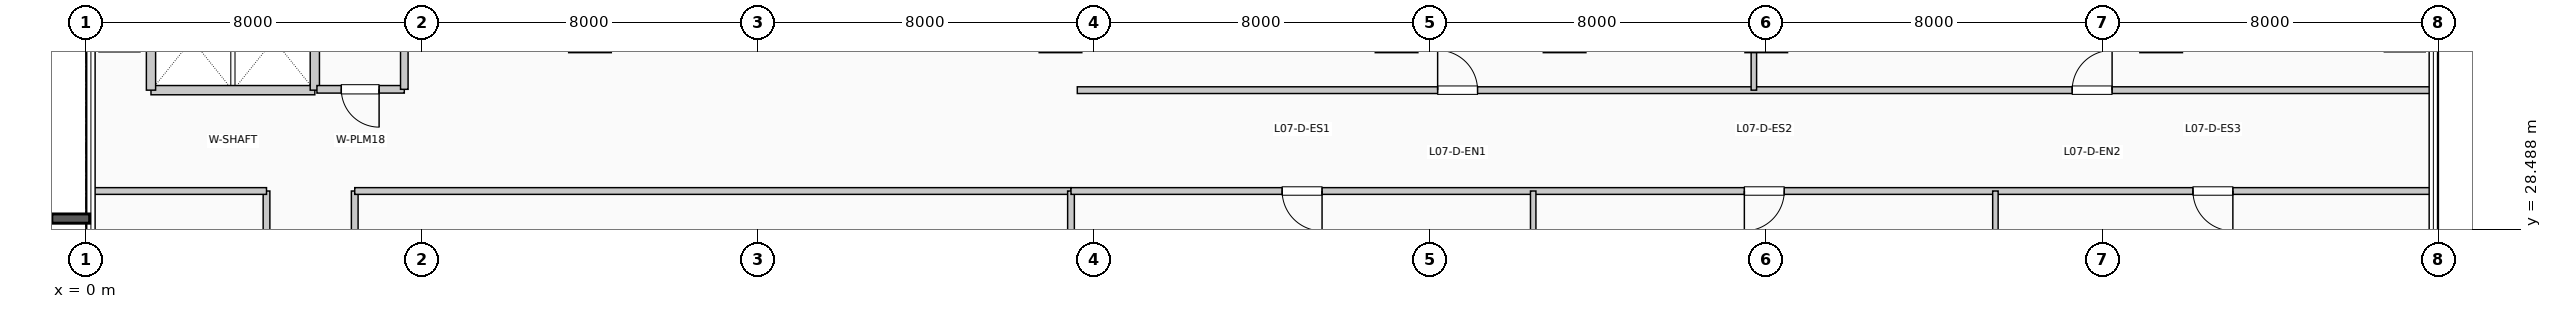
"""IFC4 building model, lengths in metres.
Left out: names, types, materials, properties, quantities, classifications, styles, units other than length and angle.
Written with IfcOpenShell. Run it as: python <this file> out.ifc"""

import sys

from ifc_helpers import new_model, si_unit, direction, frame, frame_2d, origin, place, context, subcontext, project, spatial, rectangle, extrude, element, fill, save


model = new_model("IFC4")
c1 = context("Model", 3, precision=1e-05, world=origin(), true_north=direction((0.0, 1.0)))
c2 = subcontext(c1, "Body", "Model", "MODEL_VIEW")
j1 = project(units=[si_unit("LENGTHUNIT", "METRE"), si_unit("PLANEANGLEUNIT", "RADIAN")], contexts=[c1])
p1 = place(None, origin())
s1 = spatial("IfcSite", under=j1, at=p1, CompositionType="ELEMENT")
p2 = place(p1, origin())
s2 = spatial("IfcBuilding", under=s1, at=p2, CompositionType="ELEMENT")
p3 = place(p2, frame((0.0, 0.0, 34.32)))
s3 = spatial("IfcBuildingStorey", under=s2, at=p3, CompositionType="ELEMENT", Elevation=34.32)
p4 = place(p3, frame((1.55, 31.8, 0.0), z_axis=(0.0, 0.0, 1.0), x_axis=(1.0, 0.0, 0.0)))
e1 = element("IfcWall", 1, at=p4, inside=s3, PredefinedType="PARTITIONING", context=c2, shape_type="SweptSolid", body=[
    extrude(rectangle(XDim=3.9, YDim=0.22, at=frame_2d((1.95, 0.0))), origin(), (0.0, 0.0, 1.0), 3.71),
])
for number, where, z_axis, x_axis in (
    (2, (1.55, 31.8, 0.0), (0.0, 0.0, 1.0), (0.0, 1.0, 0.0)),
    (3, (5.45, 31.8, 0.0), (0.0, 0.0, 1.0), (0.0, 1.0, 0.0)),
):
    element("IfcWall", number, at=place(p3, frame(where, z_axis=z_axis, x_axis=x_axis)), inside=s3, PredefinedType="PARTITIONING", context=c2, shape_type="SweptSolid", body=[
        extrude(rectangle(XDim=2.38, YDim=0.22, at=frame_2d((1.19, 0.0))), origin(), (0.0, 0.0, 1.0), 3.71),
    ])
p5 = place(p3, frame((5.5, 31.82, 0.0), z_axis=(0.0, 0.0, 1.0), x_axis=(1.0, 0.0, 0.0)))
e4 = element("IfcWall", 4, at=p5, inside=s3, PredefinedType="PLUMBINGWALL", context=c2, shape_type="SweptSolid", body=[
    extrude(rectangle(XDim=2.08, YDim=0.18, at=frame_2d((1.04, 0.0))), origin(), (0.0, 0.0, 1.0), 3.71),
])
p6 = place(p5, frame((1.48, 0.0, 0.0), z_axis=(0.0, 0.0, 1.0), x_axis=(-1.0, 0.0, 0.0)))
e5 = element("IfcOpeningElement", 5, at=p6, cuts=e4, PredefinedType="OPENING", context=c2, shape_type="SweptSolid", body=[
    extrude(rectangle(XDim=0.9, YDim=2.1, at=frame_2d((0.45, 1.05))), frame((0.0, 0.1, 0.0), z_axis=(0.0, -1.0, 0.0), x_axis=(1.0, 0.0, 0.0)), (0.0, 0.0, 1.0), 0.2),
])
p7 = place(p3, frame((7.58, 31.82, 0.0), z_axis=(0.0, 0.0, 1.0), x_axis=(0.0, 1.0, 0.0)))
e6 = element("IfcWall", 6, at=p7, inside=s3, PredefinedType="PLUMBINGWALL", context=c2, shape_type="SweptSolid", body=[
    extrude(rectangle(XDim=2.36, YDim=0.18, at=frame_2d((1.18, 0.0))), origin(), (0.0, 0.0, 1.0), 3.71),
])
p8 = place(p3, frame((4.3, 4.39, 0.0), z_axis=(0.0, 0.0, 1.0), x_axis=(0.0, 1.0, 0.0)))
e7 = element("IfcWall", 7, at=p8, inside=s3, PredefinedType="PARTITIONING", context=c2, shape_type="SweptSolid", body=[
    extrude(rectangle(XDim=25.01, YDim=0.16, at=frame_2d((12.505, 0.0))), origin(), (0.0, 0.0, 1.0), 3.71),
])
p9 = place(p8, frame((6.728, 0.0, 0.0), z_axis=(0.0, 0.0, 1.0), x_axis=(-1.0, 0.0, 0.0)))
e8 = element("IfcOpeningElement", 8, at=p9, cuts=e7, PredefinedType="OPENING", context=c2, shape_type="SweptSolid", body=[
    extrude(rectangle(XDim=0.95, YDim=2.15, at=frame_2d((0.475, 1.075))), frame((0.0, 0.09, 0.0), z_axis=(0.0, -1.0, 0.0), x_axis=(1.0, 0.0, 0.0)), (0.0, 0.0, 1.0), 0.18),
])
p10 = place(p8, frame((19.232, 0.0, 0.0), z_axis=(0.0, 0.0, 1.0), x_axis=(-1.0, 0.0, 0.0)))
e9 = element("IfcOpeningElement", 9, at=p10, cuts=e7, PredefinedType="OPENING", context=c2, shape_type="SweptSolid", body=[
    extrude(rectangle(XDim=0.95, YDim=2.15, at=frame_2d((0.475, 1.075))), frame((0.0, 0.09, 0.0), z_axis=(0.0, -1.0, 0.0), x_axis=(1.0, 0.0, 0.0)), (0.0, 0.0, 1.0), 0.18),
])
p11 = place(p3, frame((6.4, 4.39, 0.0), z_axis=(0.0, 0.0, 1.0), x_axis=(0.0, 1.0, 0.0)))
e10 = element("IfcWall", 10, at=p11, inside=s3, PredefinedType="PARTITIONING", context=c2, shape_type="SweptSolid", body=[
    extrude(rectangle(XDim=25.01, YDim=0.16, at=frame_2d((12.505, 0.0))), origin(), (0.0, 0.0, 1.0), 3.71),
])
p12 = place(p11, frame((2.526, 0.0, 0.0)))
e11 = element("IfcOpeningElement", 11, at=p12, cuts=e10, PredefinedType="OPENING", context=c2, shape_type="SweptSolid", body=[
    extrude(rectangle(XDim=0.95, YDim=2.15, at=frame_2d((0.475, 1.075))), frame((0.0, 0.09, 0.0), z_axis=(0.0, -1.0, 0.0), x_axis=(1.0, 0.0, 0.0)), (0.0, 0.0, 1.0), 0.18),
])
p13 = place(p11, frame((9.029, 0.0, 0.0)))
e12 = element("IfcOpeningElement", 12, at=p13, cuts=e10, PredefinedType="OPENING", context=c2, shape_type="SweptSolid", body=[
    extrude(rectangle(XDim=0.95, YDim=2.15, at=frame_2d((0.475, 1.075))), frame((0.0, 0.09, 0.0), z_axis=(0.0, -1.0, 0.0), x_axis=(1.0, 0.0, 0.0)), (0.0, 0.0, 1.0), 0.18),
])
p14 = place(p11, frame((15.781, 0.0, 0.0)))
e13 = element("IfcOpeningElement", 13, at=p14, cuts=e10, PredefinedType="OPENING", context=c2, shape_type="SweptSolid", body=[
    extrude(rectangle(XDim=0.95, YDim=2.15, at=frame_2d((0.475, 1.075))), frame((0.0, 0.09, 0.0), z_axis=(0.0, -1.0, 0.0), x_axis=(1.0, 0.0, 0.0)), (0.0, 0.0, 1.0), 0.18),
])
p15 = place(p11, frame((21.784, 0.0, 0.0)))
e14 = element("IfcOpeningElement", 14, at=p15, cuts=e10, PredefinedType="OPENING", context=c2, shape_type="SweptSolid", body=[
    extrude(rectangle(XDim=0.95, YDim=2.15, at=frame_2d((0.475, 1.075))), frame((0.0, 0.09, 0.0), z_axis=(0.0, -1.0, 0.0), x_axis=(1.0, 0.0, 0.0)), (0.0, 0.0, 1.0), 0.18),
])
p16 = place(p3, frame((0.19, 29.4, 0.0), z_axis=(0.0, 0.0, 1.0), x_axis=(1.0, 0.0, 0.0)))
e15 = element("IfcWall", 15, at=p16, inside=s3, PredefinedType="PARTITIONING", context=c2, shape_type="SweptSolid", body=[
    extrude(rectangle(XDim=4.11, YDim=0.16, at=frame_2d((2.055, 0.0))), origin(), (0.0, 0.0, 1.0), 3.365),
])
p17 = place(p3, frame((6.4, 29.4, 0.0), z_axis=(0.0, 0.0, 1.0), x_axis=(1.0, 0.0, 0.0)))
e16 = element("IfcWall", 16, at=p17, inside=s3, PredefinedType="PARTITIONING", context=c2, shape_type="SweptSolid", body=[
    extrude(rectangle(XDim=17.05, YDim=0.16, at=frame_2d((8.525, 0.0))), origin(), (0.0, 0.0, 1.0), 3.365),
])
p18 = place(p3, frame((23.45, 0.19, 0.0), z_axis=(0.0, 0.0, 1.0), x_axis=(0.0, 1.0, 0.0)))
e17 = element("IfcWall", 17, at=p18, inside=s3, PredefinedType="PARTITIONING", context=c2, shape_type="SweptSolid", body=[
    extrude(rectangle(XDim=29.21, YDim=0.16, at=frame_2d((14.605, 0.0))), origin(), (0.0, 0.0, 1.0), 2.995),
])
p19 = place(p3, frame((23.45, 29.4, 0.0), z_axis=(0.0, 0.0, 1.0), x_axis=(1.0, 0.0, 0.0)))
e18 = element("IfcWall", 18, at=p19, inside=s3, PredefinedType="PARTITIONING", context=c2, shape_type="SweptSolid", body=[
    extrude(rectangle(XDim=32.36, YDim=0.16, at=frame_2d((16.18, 0.0))), origin(), (0.0, 0.0, 1.0), 3.365),
])
p20 = place(p19, frame((5.976, 0.0, 0.0), z_axis=(0.0, 0.0, 1.0), x_axis=(-1.0, 0.0, 0.0)))
e19 = element("IfcOpeningElement", 19, at=p20, cuts=e18, PredefinedType="OPENING", context=c2, shape_type="SweptSolid", body=[
    extrude(rectangle(XDim=0.95, YDim=2.15, at=frame_2d((0.475, 1.075))), frame((0.0, 0.09, 0.0), z_axis=(0.0, -1.0, 0.0), x_axis=(1.0, 0.0, 0.0)), (0.0, 0.0, 1.0), 0.18),
])
p21 = place(p19, frame((16.979, 0.0, 0.0), z_axis=(0.0, 0.0, 1.0), x_axis=(-1.0, 0.0, 0.0)))
e20 = element("IfcOpeningElement", 20, at=p21, cuts=e18, PredefinedType="OPENING", context=c2, shape_type="SweptSolid", body=[
    extrude(rectangle(XDim=0.95, YDim=2.15, at=frame_2d((0.475, 1.075))), frame((0.0, 0.09, 0.0), z_axis=(0.0, -1.0, 0.0), x_axis=(1.0, 0.0, 0.0)), (0.0, 0.0, 1.0), 0.18),
])
p22 = place(p19, frame((27.657, 0.0, 0.0), z_axis=(0.0, 0.0, 1.0), x_axis=(-1.0, 0.0, 0.0)))
e21 = element("IfcOpeningElement", 21, at=p22, cuts=e18, PredefinedType="OPENING", context=c2, shape_type="SweptSolid", body=[
    extrude(rectangle(XDim=0.95, YDim=2.15, at=frame_2d((0.475, 1.075))), frame((0.0, 0.09, 0.0), z_axis=(0.0, -1.0, 0.0), x_axis=(1.0, 0.0, 0.0)), (0.0, 0.0, 1.0), 0.18),
])
p23 = place(p3, frame((23.6, 31.8, 0.0), z_axis=(0.0, 0.0, 1.0), x_axis=(1.0, 0.0, 0.0)))
e22 = element("IfcWall", 22, at=p23, inside=s3, PredefinedType="PARTITIONING", context=c2, shape_type="SweptSolid", body=[
    extrude(rectangle(XDim=32.21, YDim=0.16, at=frame_2d((16.105, 0.0))), origin(), (0.0, 0.0, 1.0), 3.71),
])
p24 = place(p23, frame((8.577, 0.0, 0.0)))
e23 = element("IfcOpeningElement", 23, at=p24, cuts=e22, PredefinedType="OPENING", context=c2, shape_type="SweptSolid", body=[
    extrude(rectangle(XDim=0.95, YDim=2.15, at=frame_2d((0.475, 1.075))), frame((0.0, 0.09, 0.0), z_axis=(0.0, -1.0, 0.0), x_axis=(1.0, 0.0, 0.0)), (0.0, 0.0, 1.0), 0.18),
])
p25 = place(p23, frame((23.683, 0.0, 0.0)))
e24 = element("IfcOpeningElement", 24, at=p25, cuts=e22, PredefinedType="OPENING", context=c2, shape_type="SweptSolid", body=[
    extrude(rectangle(XDim=0.95, YDim=2.15, at=frame_2d((0.475, 1.075))), frame((0.0, 0.09, 0.0), z_axis=(0.0, -1.0, 0.0), x_axis=(1.0, 0.0, 0.0)), (0.0, 0.0, 1.0), 0.18),
])
for number, where, z_axis, x_axis in (
    (25, (34.452, 18.19, 0.0), (0.0, 0.0, 1.0), (0.0, 1.0, 0.0)),
    (26, (45.455, 18.19, 0.0), (0.0, 0.0, 1.0), (0.0, 1.0, 0.0)),
):
    element("IfcWall", number, at=place(p3, frame(where, z_axis=z_axis, x_axis=x_axis)), inside=s3, PredefinedType="PARTITIONING", context=c2, shape_type="SweptSolid", body=[
        extrude(rectangle(XDim=11.21, YDim=0.13, at=frame_2d((5.605, 0.0))), origin(), (0.0, 0.0, 1.0), 3.71),
    ])
p26 = place(p3, frame((39.705, 31.8, 0.0), z_axis=(0.0, 0.0, 1.0), x_axis=(0.0, 1.0, 0.0)))
e27 = element("IfcWall", 27, at=p26, inside=s3, PredefinedType="PARTITIONING", context=c2, shape_type="SweptSolid", body=[
    extrude(rectangle(XDim=14.01, YDim=0.13, at=frame_2d((7.005, 0.0))), origin(), (0.0, 0.0, 1.0), 2.995),
])
p27 = place(p6, origin())
e28 = element("IfcDoor", 28, at=p27, inside=s3, OperationType="SINGLE_SWING_RIGHT", PredefinedType="DOOR", context=c2, shape_type="SweptSolid", body=[
    extrude(rectangle(XDim=0.9, YDim=2.1, at=frame_2d((0.45, 1.05))), frame((0.0, 0.025, 0.0), z_axis=(0.0, -1.0, 0.0), x_axis=(1.0, 0.0, 0.0)), (0.0, 0.0, 1.0), 0.05),
])
fill(e5, e28)
p28 = place(p20, origin())
e29 = element("IfcDoor", 29, at=p28, inside=s3, OperationType="SINGLE_SWING_RIGHT", PredefinedType="DOOR", context=c2, shape_type="SweptSolid", body=[
    extrude(rectangle(XDim=0.95, YDim=2.15, at=frame_2d((0.475, 1.075))), frame((0.0, 0.025, 0.0), z_axis=(0.0, -1.0, 0.0), x_axis=(1.0, 0.0, 0.0)), (0.0, 0.0, 1.0), 0.05),
])
fill(e19, e29)
p29 = place(p21, origin())
e30 = element("IfcDoor", 30, at=p29, inside=s3, OperationType="SINGLE_SWING_LEFT", PredefinedType="DOOR", context=c2, shape_type="SweptSolid", body=[
    extrude(rectangle(XDim=0.95, YDim=2.15, at=frame_2d((0.475, 1.075))), frame((0.0, 0.025, 0.0), z_axis=(0.0, -1.0, 0.0), x_axis=(1.0, 0.0, 0.0)), (0.0, 0.0, 1.0), 0.05),
])
fill(e20, e30)
p30 = place(p22, origin())
e31 = element("IfcDoor", 31, at=p30, inside=s3, OperationType="SINGLE_SWING_RIGHT", PredefinedType="DOOR", context=c2, shape_type="SweptSolid", body=[
    extrude(rectangle(XDim=0.95, YDim=2.15, at=frame_2d((0.475, 1.075))), frame((0.0, 0.025, 0.0), z_axis=(0.0, -1.0, 0.0), x_axis=(1.0, 0.0, 0.0)), (0.0, 0.0, 1.0), 0.05),
])
fill(e21, e31)
p31 = place(p24, origin())
e32 = element("IfcDoor", 32, at=p31, inside=s3, OperationType="SINGLE_SWING_LEFT", PredefinedType="DOOR", context=c2, shape_type="SweptSolid", body=[
    extrude(rectangle(XDim=0.95, YDim=2.15, at=frame_2d((0.475, 1.075))), frame((0.0, 0.025, 0.0), z_axis=(0.0, -1.0, 0.0), x_axis=(1.0, 0.0, 0.0)), (0.0, 0.0, 1.0), 0.05),
])
fill(e23, e32)
p32 = place(p25, origin())
e33 = element("IfcDoor", 33, at=p32, inside=s3, OperationType="SINGLE_SWING_RIGHT", PredefinedType="DOOR", context=c2, shape_type="SweptSolid", body=[
    extrude(rectangle(XDim=0.95, YDim=2.15, at=frame_2d((0.475, 1.075))), frame((0.0, 0.025, 0.0), z_axis=(0.0, -1.0, 0.0), x_axis=(1.0, 0.0, 0.0)), (0.0, 0.0, 1.0), 0.05),
])
fill(e24, e33)
save(model, sys.argv[1])
